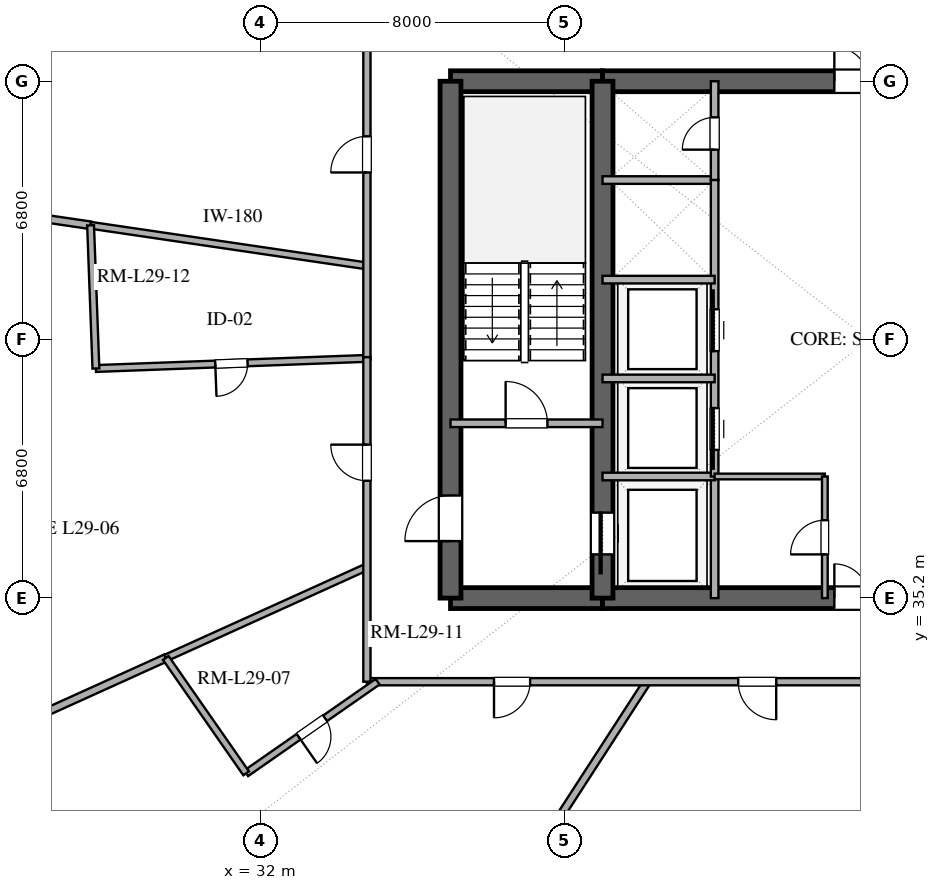
"""IFC4 building model, lengths in metres.
Left out: names, types, materials, properties, quantities, classifications, styles, units other than length and angle.
Written with IfcOpenShell. Run it as: python <this file> out.ifc"""

import sys

from ifc_helpers import new_model, si_unit, direction, frame, frame_2d, origin, place, context, subcontext, project, spatial, rectangle, extrude, element, fill, save


model = new_model("IFC4")
c1 = context("Model", 3, precision=1e-05, world=origin(), true_north=direction((0.0, 1.0)))
c2 = subcontext(c1, "Body", "Model", "MODEL_VIEW")
j1 = project(units=[si_unit("LENGTHUNIT", "METRE"), si_unit("PLANEANGLEUNIT", "RADIAN")], contexts=[c1])
p1 = place(None, origin())
s1 = spatial("IfcSite", under=j1, at=p1, CompositionType="ELEMENT")
p2 = place(p1, origin())
s2 = spatial("IfcBuilding", under=s1, at=p2, CompositionType="ELEMENT")
p3 = place(p2, frame((0.0, 0.0, 116.4)))
s3 = spatial("IfcBuildingStorey", under=s2, at=p3, CompositionType="ELEMENT", Elevation=116.4)
p4 = place(p3, frame((37.0, 35.2, 0.0), z_axis=(0.0, 0.0, 1.0), x_axis=(1.0, 0.0, 0.0)))
e1 = element("IfcWall", 1, at=p4, inside=s3, PredefinedType="SHEAR", context=c2, shape_type="SweptSolid", body=[
    extrude(rectangle(XDim=4.0, YDim=0.55, at=frame_2d((2.0, 0.0))), origin(), (0.0, 0.0, 1.0), 3.38),
])
p5 = place(p3, frame((41.0, 35.2, 0.0), z_axis=(0.0, 0.0, 1.0), x_axis=(1.0, 0.0, 0.0)))
e2 = element("IfcWall", 2, at=p5, inside=s3, PredefinedType="SHEAR", context=c2, shape_type="SweptSolid", body=[
    extrude(rectangle(XDim=14.0, YDim=0.55, at=frame_2d((7.0, 0.0))), origin(), (0.0, 0.0, 1.0), 3.38),
])
p6 = place(p5, frame((6.1, 0.0, 0.0)))
e3 = element("IfcOpeningElement", 3, at=p6, cuts=e2, PredefinedType="OPENING", context=c2, shape_type="SweptSolid", body=[
    extrude(rectangle(XDim=1.8, YDim=2.25, at=frame_2d((0.9, 1.125))), frame((0.0, 0.285, 0.0), z_axis=(0.0, -1.0, 0.0), x_axis=(1.0, 0.0, 0.0)), (0.0, 0.0, 1.0), 0.57),
])
p7 = place(p3, frame((37.0, 48.8, 0.0), z_axis=(0.0, 0.0, 1.0), x_axis=(1.0, 0.0, 0.0)))
e4 = element("IfcWall", 4, at=p7, inside=s3, PredefinedType="SHEAR", context=c2, shape_type="SweptSolid", body=[
    extrude(rectangle(XDim=4.0, YDim=0.55, at=frame_2d((2.0, 0.0))), origin(), (0.0, 0.0, 1.0), 3.38),
])
p8 = place(p3, frame((41.0, 48.8, 0.0), z_axis=(0.0, 0.0, 1.0), x_axis=(1.0, 0.0, 0.0)))
e5 = element("IfcWall", 5, at=p8, inside=s3, PredefinedType="SHEAR", context=c2, shape_type="SweptSolid", body=[
    extrude(rectangle(XDim=14.0, YDim=0.55, at=frame_2d((7.0, 0.0))), origin(), (0.0, 0.0, 1.0), 3.38),
])
p9 = place(p8, frame((6.1, 0.0, 0.0)))
e6 = element("IfcOpeningElement", 6, at=p9, cuts=e5, PredefinedType="OPENING", context=c2, shape_type="SweptSolid", body=[
    extrude(rectangle(XDim=1.8, YDim=2.25, at=frame_2d((0.9, 1.125))), frame((0.0, 0.285, 0.0), z_axis=(0.0, -1.0, 0.0), x_axis=(1.0, 0.0, 0.0)), (0.0, 0.0, 1.0), 0.57),
])
p10 = place(p3, frame((37.0, 35.2, 0.0), z_axis=(0.0, 0.0, 1.0), x_axis=(0.0, 1.0, 0.0)))
e7 = element("IfcWall", 7, at=p10, inside=s3, PredefinedType="SHEAR", context=c2, shape_type="SweptSolid", body=[
    extrude(rectangle(XDim=13.6, YDim=0.55, at=frame_2d((6.8, 0.0))), origin(), (0.0, 0.0, 1.0), 3.38),
])
p11 = place(p10, frame((1.5, 0.0, 0.0)))
e8 = element("IfcOpeningElement", 8, at=p11, cuts=e7, PredefinedType="OPENING", context=c2, shape_type="SweptSolid", body=[
    extrude(rectangle(XDim=1.2, YDim=2.15, at=frame_2d((0.6, 1.075))), frame((0.0, 0.285, 0.0), z_axis=(0.0, -1.0, 0.0), x_axis=(1.0, 0.0, 0.0)), (0.0, 0.0, 1.0), 0.57),
])
p12 = place(p3, frame((41.0, 35.2, 0.0), z_axis=(0.0, 0.0, 1.0), x_axis=(0.0, 1.0, 0.0)))
e9 = element("IfcWall", 9, at=p12, inside=s3, PredefinedType="SHEAR", context=c2, shape_type="SweptSolid", body=[
    extrude(rectangle(XDim=13.6, YDim=0.55, at=frame_2d((6.8, 0.0))), origin(), (0.0, 0.0, 1.0), 3.38),
])
p13 = place(p12, frame((1.15, 0.0, 0.0)))
e10 = element("IfcOpeningElement", 10, at=p13, cuts=e9, PredefinedType="OPENING", context=c2, shape_type="SweptSolid", body=[
    extrude(rectangle(XDim=1.1, YDim=2.2, at=frame_2d((0.55, 1.1))), frame((0.0, 0.285, 0.0), z_axis=(0.0, -1.0, 0.0), x_axis=(1.0, 0.0, 0.0)), (0.0, 0.0, 1.0), 0.57),
])
p14 = place(p3, frame((37.0, 39.8, 0.0), z_axis=(0.0, 0.0, 1.0), x_axis=(1.0, 0.0, 0.0)))
e11 = element("IfcWall", 11, at=p14, inside=s3, PredefinedType="SOLIDWALL", context=c2, shape_type="SweptSolid", body=[
    extrude(rectangle(XDim=4.0, YDim=0.2, at=frame_2d((2.0, 0.0))), origin(), (0.0, 0.0, 1.0), 2.74),
])
p15 = place(p14, frame((1.45, 0.0, 0.0)))
e12 = element("IfcOpeningElement", 12, at=p15, cuts=e11, PredefinedType="OPENING", context=c2, shape_type="SweptSolid", body=[
    extrude(rectangle(XDim=1.1, YDim=2.15, at=frame_2d((0.55, 1.075))), frame((0.0, 0.11, 0.0), z_axis=(0.0, -1.0, 0.0), x_axis=(1.0, 0.0, 0.0)), (0.0, 0.0, 1.0), 0.22),
])
p16 = place(p3, frame((43.95, 35.2, 0.0), z_axis=(0.0, 0.0, 1.0), x_axis=(0.0, 1.0, 0.0)))
e13 = element("IfcWall", 13, at=p16, inside=s3, PredefinedType="SOLIDWALL", context=c2, shape_type="SweptSolid", body=[
    extrude(rectangle(XDim=3.2, YDim=0.2, at=frame_2d((1.6, 0.0))), origin(), (0.0, 0.0, 1.0), 2.74),
])
for number, where, z_axis, x_axis in (
    (14, (41.0, 38.4, 0.0), (0.0, 0.0, 1.0), (1.0, 0.0, 0.0)),
    (15, (41.0, 46.2, 0.0), (0.0, 0.0, 1.0), (1.0, 0.0, 0.0)),
):
    element("IfcWall", number, at=place(p3, frame(where, z_axis=z_axis, x_axis=x_axis)), inside=s3, PredefinedType="SOLIDWALL", context=c2, shape_type="SweptSolid", body=[
        extrude(rectangle(XDim=2.95, YDim=0.2, at=frame_2d((1.475, 0.0))), origin(), (0.0, 0.0, 1.0), 2.74),
    ])
p17 = place(p3, frame((43.95, 46.2, 0.0), z_axis=(0.0, 0.0, 1.0), x_axis=(0.0, 1.0, 0.0)))
e16 = element("IfcWall", 16, at=p17, inside=s3, PredefinedType="SOLIDWALL", context=c2, shape_type="SweptSolid", body=[
    extrude(rectangle(XDim=2.6, YDim=0.2, at=frame_2d((1.3, 0.0))), origin(), (0.0, 0.0, 1.0), 2.74),
])
p18 = place(p17, frame((0.8, 0.0, 0.0)))
e17 = element("IfcOpeningElement", 17, at=p18, cuts=e16, PredefinedType="OPENING", context=c2, shape_type="SweptSolid", body=[
    extrude(rectangle(XDim=0.85, YDim=2.15, at=frame_2d((0.425, 1.075))), frame((0.0, 0.11, 0.0), z_axis=(0.0, -1.0, 0.0), x_axis=(1.0, 0.0, 0.0)), (0.0, 0.0, 1.0), 0.22),
])
p19 = place(p3, frame((43.95, 38.4, 0.0), z_axis=(0.0, 0.0, 1.0), x_axis=(0.0, 1.0, 0.0)))
e18 = element("IfcWall", 18, at=p19, inside=s3, PredefinedType="SOLIDWALL", context=c2, shape_type="SweptSolid", body=[
    extrude(rectangle(XDim=7.8, YDim=0.2, at=frame_2d((3.9, 0.0))), origin(), (0.0, 0.0, 1.0), 2.74),
])
p20 = place(p19, frame((0.7, 0.0, 0.0)))
e19 = element("IfcOpeningElement", 19, at=p20, cuts=e18, PredefinedType="OPENING", context=c2, shape_type="SweptSolid", body=[
    extrude(rectangle(XDim=1.1, YDim=2.2, at=frame_2d((0.55, 1.1))), frame((0.0, 0.11, 0.0), z_axis=(0.0, -1.0, 0.0), x_axis=(1.0, 0.0, 0.0)), (0.0, 0.0, 1.0), 0.22),
])
p21 = place(p19, frame((3.3, 0.0, 0.0)))
e20 = element("IfcOpeningElement", 20, at=p21, cuts=e18, PredefinedType="OPENING", context=c2, shape_type="SweptSolid", body=[
    extrude(rectangle(XDim=1.1, YDim=2.2, at=frame_2d((0.55, 1.1))), frame((0.0, 0.11, 0.0), z_axis=(0.0, -1.0, 0.0), x_axis=(1.0, 0.0, 0.0)), (0.0, 0.0, 1.0), 0.22),
])
for number, where, z_axis, x_axis in (
    (21, (41.0, 40.98, 0.0), (0.0, 0.0, 1.0), (1.0, 0.0, 0.0)),
    (22, (41.0, 43.58, 0.0), (0.0, 0.0, 1.0), (1.0, 0.0, 0.0)),
):
    element("IfcWall", number, at=place(p3, frame(where, z_axis=z_axis, x_axis=x_axis)), inside=s3, PredefinedType="SOLIDWALL", context=c2, shape_type="SweptSolid", body=[
        extrude(rectangle(XDim=2.95, YDim=0.2, at=frame_2d((1.475, 0.0))), origin(), (0.0, 0.0, 1.0), 2.74),
    ])
p22 = place(p3, frame((43.95, 38.4, 0.0), z_axis=(0.0, 0.0, 1.0), x_axis=(1.0, 0.0, 0.0)))
e23 = element("IfcWall", 23, at=p22, inside=s3, PredefinedType="PARTITIONING", context=c2, shape_type="SweptSolid", body=[
    extrude(rectangle(XDim=2.9, YDim=0.15, at=frame_2d((1.45, 0.0))), origin(), (0.0, 0.0, 1.0), 2.74),
])
p23 = place(p3, frame((46.85, 35.2, 0.0), z_axis=(0.0, 0.0, 1.0), x_axis=(0.0, 1.0, 0.0)))
e24 = element("IfcWall", 24, at=p23, inside=s3, PredefinedType="PARTITIONING", context=c2, shape_type="SweptSolid", body=[
    extrude(rectangle(XDim=3.2, YDim=0.15, at=frame_2d((1.6, 0.0))), origin(), (0.0, 0.0, 1.0), 2.74),
])
p24 = place(p23, frame((1.15, 0.0, 0.0)))
e25 = element("IfcOpeningElement", 25, at=p24, cuts=e24, PredefinedType="OPENING", context=c2, shape_type="SweptSolid", body=[
    extrude(rectangle(XDim=0.9, YDim=2.15, at=frame_2d((0.45, 1.075))), frame((0.0, 0.085, 0.0), z_axis=(0.0, -1.0, 0.0), x_axis=(1.0, 0.0, 0.0)), (0.0, 0.0, 1.0), 0.17),
])
p25 = place(p3, frame((35.037, 21.969, 0.0), z_axis=(0.0, 0.0, 1.0), x_axis=(0.543298274368, 0.839539745973, 0.0)))
e26 = element("IfcWall", 26, at=p25, inside=s3, PredefinedType="PARTITIONING", context=c2, shape_type="SweptSolid", body=[
    extrude(rectangle(XDim=13.139, YDim=0.2, at=frame_2d((6.57, 0.0))), origin(), (0.0, 0.0, 1.0), 2.74),
])
p26 = place(p3, frame((19.982, 46.119, 0.0), z_axis=(0.0, 0.0, 1.0), x_axis=(0.989365774641, -0.14544883626, 0.0)))
e27 = element("IfcWall", 27, at=p26, inside=s3, PredefinedType="PARTITIONING", context=c2, shape_type="SweptSolid", body=[
    extrude(rectangle(XDim=7.627, YDim=0.2, at=frame_2d((3.813, 0.0))), origin(), (0.0, 0.0, 1.0), 2.74),
])
p27 = place(p3, frame((27.528, 45.01, 0.0), z_axis=(0.0, 0.0, 1.0), x_axis=(0.989364619243, -0.145456695238, 0.0)))
e28 = element("IfcWall", 28, at=p27, inside=s3, PredefinedType="PLUMBINGWALL", context=c2, shape_type="SweptSolid", body=[
    extrude(rectangle(XDim=7.35, YDim=0.18, at=frame_2d((3.675, 0.0))), origin(), (0.0, 0.0, 1.0), 2.74),
])
p28 = place(p3, frame((49.671, 33.0, 0.0), z_axis=(0.0, 0.0, 1.0), x_axis=(-1.0, 0.0, 0.0)))
e29 = element("IfcWall", 29, at=p28, inside=s3, PredefinedType="PARTITIONING", context=c2, shape_type="SweptSolid", body=[
    extrude(rectangle(XDim=14.871, YDim=0.19, at=frame_2d((7.436, 0.0))), origin(), (0.0, 0.0, 1.0), 2.74),
])
p29 = place(p28, frame((10.576, 0.0, 0.0)))
e30 = element("IfcOpeningElement", 30, at=p29, cuts=e29, PredefinedType="OPENING", context=c2, shape_type="SweptSolid", body=[
    extrude(rectangle(XDim=0.95, YDim=2.15, at=frame_2d((0.475, 1.075))), frame((0.0, 0.105, 0.0), z_axis=(0.0, -1.0, 0.0), x_axis=(1.0, 0.0, 0.0)), (0.0, 0.0, 1.0), 0.21),
])
p30 = place(p28, frame((4.101, 0.0, 0.0)))
e31 = element("IfcOpeningElement", 31, at=p30, cuts=e29, PredefinedType="OPENING", context=c2, shape_type="SweptSolid", body=[
    extrude(rectangle(XDim=1.0, YDim=2.2, at=frame_2d((0.5, 1.1))), frame((0.0, 0.105, 0.0), z_axis=(0.0, -1.0, 0.0), x_axis=(1.0, 0.0, 0.0)), (0.0, 0.0, 1.0), 0.21),
])
p31 = place(p3, frame((34.8, 41.508, 0.0), z_axis=(0.0, 0.0, 1.0), x_axis=(-0.999305711591, -0.037257144028, 0.0)))
e32 = element("IfcWall", 32, at=p31, inside=s3, PredefinedType="PLUMBINGWALL", context=c2, shape_type="SweptSolid", body=[
    extrude(rectangle(XDim=7.136, YDim=0.18, at=frame_2d((3.568, 0.0))), origin(), (0.0, 0.0, 1.0), 2.74),
])
p32 = place(p31, frame((3.143, 0.0, 0.0)))
e33 = element("IfcOpeningElement", 33, at=p32, cuts=e32, PredefinedType="OPENING", context=c2, shape_type="SweptSolid", body=[
    extrude(rectangle(XDim=0.85, YDim=2.1, at=frame_2d((0.425, 1.05))), frame((0.0, 0.1, 0.0), z_axis=(0.0, -1.0, 0.0), x_axis=(1.0, 0.0, 0.0)), (0.0, 0.0, 1.0), 0.2),
])
p33 = place(p3, frame((23.185, 30.762, 0.0), z_axis=(0.0, 0.0, 1.0), x_axis=(0.910940213411, 0.412538395292, 0.0)))
e34 = element("IfcWall", 34, at=p33, inside=s3, PredefinedType="PARTITIONING", context=c2, shape_type="SweptSolid", body=[
    extrude(rectangle(XDim=6.941, YDim=0.2, at=frame_2d((3.47, 0.0))), origin(), (0.0, 0.0, 1.0), 2.74),
])
p34 = place(p3, frame((34.8, 41.476, 0.0), z_axis=(0.0, 0.0, 1.0), x_axis=(0.0, 1.0, 0.0)))
e35 = element("IfcWall", 35, at=p34, inside=s3, PredefinedType="PARTITIONING", context=c2, shape_type="SweptSolid", body=[
    extrude(rectangle(XDim=9.524, YDim=0.19, at=frame_2d((4.762, 0.0))), origin(), (0.0, 0.0, 1.0), 2.74),
])
p35 = place(p34, frame((4.924, 0.0, 0.0)))
e36 = element("IfcOpeningElement", 36, at=p35, cuts=e35, PredefinedType="OPENING", context=c2, shape_type="SweptSolid", body=[
    extrude(rectangle(XDim=0.95, YDim=2.15, at=frame_2d((0.475, 1.075))), frame((0.0, 0.105, 0.0), z_axis=(0.0, -1.0, 0.0), x_axis=(1.0, 0.0, 0.0)), (0.0, 0.0, 1.0), 0.21),
])
p36 = place(p3, frame((29.507, 33.625, 0.0), z_axis=(0.0, 0.0, 1.0), x_axis=(0.910959840523, 0.412495053248, 0.0)))
e37 = element("IfcWall", 37, at=p36, inside=s3, PredefinedType="PLUMBINGWALL", context=c2, shape_type="SweptSolid", body=[
    extrude(rectangle(XDim=5.81, YDim=0.18, at=frame_2d((2.905, 0.0))), origin(), (0.0, 0.0, 1.0), 2.74),
])
p37 = place(p3, frame((34.8, 33.0, 0.0), z_axis=(0.0, 0.0, 1.0), x_axis=(0.0, 1.0, 0.0)))
e38 = element("IfcWall", 38, at=p37, inside=s3, PredefinedType="PARTITIONING", context=c2, shape_type="SweptSolid", body=[
    extrude(rectangle(XDim=8.54, YDim=0.19, at=frame_2d((4.27, 0.0))), origin(), (0.0, 0.0, 1.0), 2.74),
])
p38 = place(p37, frame((5.288, 0.0, 0.0)))
e39 = element("IfcOpeningElement", 39, at=p38, cuts=e38, PredefinedType="OPENING", context=c2, shape_type="SweptSolid", body=[
    extrude(rectangle(XDim=0.95, YDim=2.15, at=frame_2d((0.475, 1.075))), frame((0.0, 0.105, 0.0), z_axis=(0.0, -1.0, 0.0), x_axis=(1.0, 0.0, 0.0)), (0.0, 0.0, 1.0), 0.21),
])
p39 = place(p3, frame((35.081, 33.0, 0.0), z_axis=(0.0, 0.0, 1.0), x_axis=(-0.820508449427, -0.571634397512, 0.0)))
e40 = element("IfcWall", 40, at=p39, inside=s3, PredefinedType="PLUMBINGWALL", context=c2, shape_type="SweptSolid", body=[
    extrude(rectangle(XDim=4.216, YDim=0.18, at=frame_2d((2.108, 0.0))), origin(), (0.0, 0.0, 1.0), 2.74),
])
p40 = place(p39, frame((1.683, 0.0, 0.0)))
e41 = element("IfcOpeningElement", 41, at=p40, cuts=e40, PredefinedType="OPENING", context=c2, shape_type="SweptSolid", body=[
    extrude(rectangle(XDim=0.85, YDim=2.1, at=frame_2d((0.425, 1.05))), frame((0.0, 0.1, 0.0), z_axis=(0.0, -1.0, 0.0), x_axis=(1.0, 0.0, 0.0)), (0.0, 0.0, 1.0), 0.2),
])
p41 = place(p3, frame((27.669, 41.242, 0.0), z_axis=(0.0, 0.0, 1.0), x_axis=(-0.037294239527, 0.999304327869, 0.0)))
e42 = element("IfcWall", 42, at=p41, inside=s3, PredefinedType="PLUMBINGWALL", context=c2, shape_type="SweptSolid", body=[
    extrude(rectangle(XDim=3.771, YDim=0.18, at=frame_2d((1.885, 0.0))), origin(), (0.0, 0.0, 1.0), 2.74),
])
p42 = place(p3, frame((31.622, 30.59, 0.0), z_axis=(0.0, 0.0, 1.0), x_axis=(-0.571609603384, 0.820525722521, 0.0)))
e43 = element("IfcWall", 43, at=p42, inside=s3, PredefinedType="PLUMBINGWALL", context=c2, shape_type="SweptSolid", body=[
    extrude(rectangle(XDim=3.7, YDim=0.18, at=frame_2d((1.85, 0.0))), origin(), (0.0, 0.0, 1.0), 2.74),
])
p43 = place(p13, origin())
e44 = element("IfcDoor", 44, at=p43, inside=s3, OperationType="SLIDING_TO_LEFT", PredefinedType="DOOR", context=c2, shape_type="SweptSolid", body=[
    extrude(rectangle(XDim=1.1, YDim=2.2, at=frame_2d((0.55, 1.1))), frame((0.0, 0.025, 0.0), z_axis=(0.0, -1.0, 0.0), x_axis=(1.0, 0.0, 0.0)), (0.0, 0.0, 1.0), 0.05),
])
fill(e10, e44)
p44 = place(p11, origin())
e45 = element("IfcDoor", 45, at=p44, inside=s3, OperationType="SINGLE_SWING_LEFT", PredefinedType="DOOR", context=c2, shape_type="SweptSolid", body=[
    extrude(rectangle(XDim=1.2, YDim=2.15, at=frame_2d((0.6, 1.075))), frame((0.0, 0.025, 0.0), z_axis=(0.0, -1.0, 0.0), x_axis=(1.0, 0.0, 0.0)), (0.0, 0.0, 1.0), 0.05),
])
fill(e8, e45)
p45 = place(p6, origin())
e46 = element("IfcDoor", 46, at=p45, inside=s3, OperationType="DOUBLE_DOOR_SINGLE_SWING", PredefinedType="DOOR", context=c2, shape_type="SweptSolid", body=[
    extrude(rectangle(XDim=1.8, YDim=2.25, at=frame_2d((0.9, 1.125))), frame((0.0, 0.025, 0.0), z_axis=(0.0, -1.0, 0.0), x_axis=(1.0, 0.0, 0.0)), (0.0, 0.0, 1.0), 0.05),
])
fill(e3, e46)
p46 = place(p9, origin())
e47 = element("IfcDoor", 47, at=p46, inside=s3, OperationType="DOUBLE_DOOR_SINGLE_SWING", PredefinedType="DOOR", context=c2, shape_type="SweptSolid", body=[
    extrude(rectangle(XDim=1.8, YDim=2.25, at=frame_2d((0.9, 1.125))), frame((0.0, 0.025, 0.0), z_axis=(0.0, -1.0, 0.0), x_axis=(1.0, 0.0, 0.0)), (0.0, 0.0, 1.0), 0.05),
])
fill(e6, e47)
p47 = place(p15, origin())
e48 = element("IfcDoor", 48, at=p47, inside=s3, OperationType="SINGLE_SWING_LEFT", PredefinedType="DOOR", context=c2, shape_type="SweptSolid", body=[
    extrude(rectangle(XDim=1.1, YDim=2.15, at=frame_2d((0.55, 1.075))), frame((0.0, 0.025, 0.0), z_axis=(0.0, -1.0, 0.0), x_axis=(1.0, 0.0, 0.0)), (0.0, 0.0, 1.0), 0.05),
])
fill(e12, e48)
p48 = place(p18, origin())
e49 = element("IfcDoor", 49, at=p48, inside=s3, OperationType="SINGLE_SWING_LEFT", PredefinedType="DOOR", context=c2, shape_type="SweptSolid", body=[
    extrude(rectangle(XDim=0.85, YDim=2.15, at=frame_2d((0.425, 1.075))), frame((0.0, 0.025, 0.0), z_axis=(0.0, -1.0, 0.0), x_axis=(1.0, 0.0, 0.0)), (0.0, 0.0, 1.0), 0.05),
])
fill(e17, e49)
p49 = place(p20, origin())
e50 = element("IfcDoor", 50, at=p49, inside=s3, OperationType="SLIDING_TO_LEFT", PredefinedType="DOOR", context=c2, shape_type="SweptSolid", body=[
    extrude(rectangle(XDim=1.1, YDim=2.2, at=frame_2d((0.55, 1.1))), frame((0.0, 0.025, 0.0), z_axis=(0.0, -1.0, 0.0), x_axis=(1.0, 0.0, 0.0)), (0.0, 0.0, 1.0), 0.05),
])
fill(e19, e50)
p50 = place(p21, origin())
e51 = element("IfcDoor", 51, at=p50, inside=s3, OperationType="SLIDING_TO_RIGHT", PredefinedType="DOOR", context=c2, shape_type="SweptSolid", body=[
    extrude(rectangle(XDim=1.1, YDim=2.2, at=frame_2d((0.55, 1.1))), frame((0.0, 0.025, 0.0), z_axis=(0.0, -1.0, 0.0), x_axis=(1.0, 0.0, 0.0)), (0.0, 0.0, 1.0), 0.05),
])
fill(e20, e51)
p51 = place(p24, origin())
e52 = element("IfcDoor", 52, at=p51, inside=s3, OperationType="SINGLE_SWING_LEFT", PredefinedType="DOOR", context=c2, shape_type="SweptSolid", body=[
    extrude(rectangle(XDim=0.9, YDim=2.15, at=frame_2d((0.45, 1.075))), frame((0.0, 0.025, 0.0), z_axis=(0.0, -1.0, 0.0), x_axis=(1.0, 0.0, 0.0)), (0.0, 0.0, 1.0), 0.05),
])
fill(e25, e52)
p52 = place(p29, origin())
e53 = element("IfcDoor", 53, at=p52, inside=s3, OperationType="SINGLE_SWING_RIGHT", PredefinedType="DOOR", context=c2, shape_type="SweptSolid", body=[
    extrude(rectangle(XDim=0.95, YDim=2.15, at=frame_2d((0.475, 1.075))), frame((0.0, 0.025, 0.0), z_axis=(0.0, -1.0, 0.0), x_axis=(1.0, 0.0, 0.0)), (0.0, 0.0, 1.0), 0.05),
])
fill(e30, e53)
p53 = place(p30, origin())
e54 = element("IfcDoor", 54, at=p53, inside=s3, OperationType="SINGLE_SWING_LEFT", PredefinedType="DOOR", context=c2, shape_type="SweptSolid", body=[
    extrude(rectangle(XDim=1.0, YDim=2.2, at=frame_2d((0.5, 1.1))), frame((0.0, 0.025, 0.0), z_axis=(0.0, -1.0, 0.0), x_axis=(1.0, 0.0, 0.0)), (0.0, 0.0, 1.0), 0.05),
])
fill(e31, e54)
p54 = place(p32, origin())
e55 = element("IfcDoor", 55, at=p54, inside=s3, OperationType="SINGLE_SWING_RIGHT", PredefinedType="DOOR", context=c2, shape_type="SweptSolid", body=[
    extrude(rectangle(XDim=0.85, YDim=2.1, at=frame_2d((0.425, 1.05))), frame((0.0, 0.025, 0.0), z_axis=(0.0, -1.0, 0.0), x_axis=(1.0, 0.0, 0.0)), (0.0, 0.0, 1.0), 0.05),
])
fill(e33, e55)
p55 = place(p35, origin())
e56 = element("IfcDoor", 56, at=p55, inside=s3, OperationType="SINGLE_SWING_LEFT", PredefinedType="DOOR", context=c2, shape_type="SweptSolid", body=[
    extrude(rectangle(XDim=0.95, YDim=2.15, at=frame_2d((0.475, 1.075))), frame((0.0, 0.025, 0.0), z_axis=(0.0, -1.0, 0.0), x_axis=(1.0, 0.0, 0.0)), (0.0, 0.0, 1.0), 0.05),
])
fill(e36, e56)
p56 = place(p38, origin())
e57 = element("IfcDoor", 57, at=p56, inside=s3, OperationType="SINGLE_SWING_RIGHT", PredefinedType="DOOR", context=c2, shape_type="SweptSolid", body=[
    extrude(rectangle(XDim=0.95, YDim=2.15, at=frame_2d((0.475, 1.075))), frame((0.0, 0.025, 0.0), z_axis=(0.0, -1.0, 0.0), x_axis=(1.0, 0.0, 0.0)), (0.0, 0.0, 1.0), 0.05),
])
fill(e39, e57)
p57 = place(p40, origin())
e58 = element("IfcDoor", 58, at=p57, inside=s3, OperationType="SINGLE_SWING_RIGHT", PredefinedType="DOOR", context=c2, shape_type="SweptSolid", body=[
    extrude(rectangle(XDim=0.85, YDim=2.1, at=frame_2d((0.425, 1.05))), frame((0.0, 0.025, 0.0), z_axis=(0.0, -1.0, 0.0), x_axis=(1.0, 0.0, 0.0)), (0.0, 0.0, 1.0), 0.05),
])
fill(e41, e58)
save(model, sys.argv[1])
